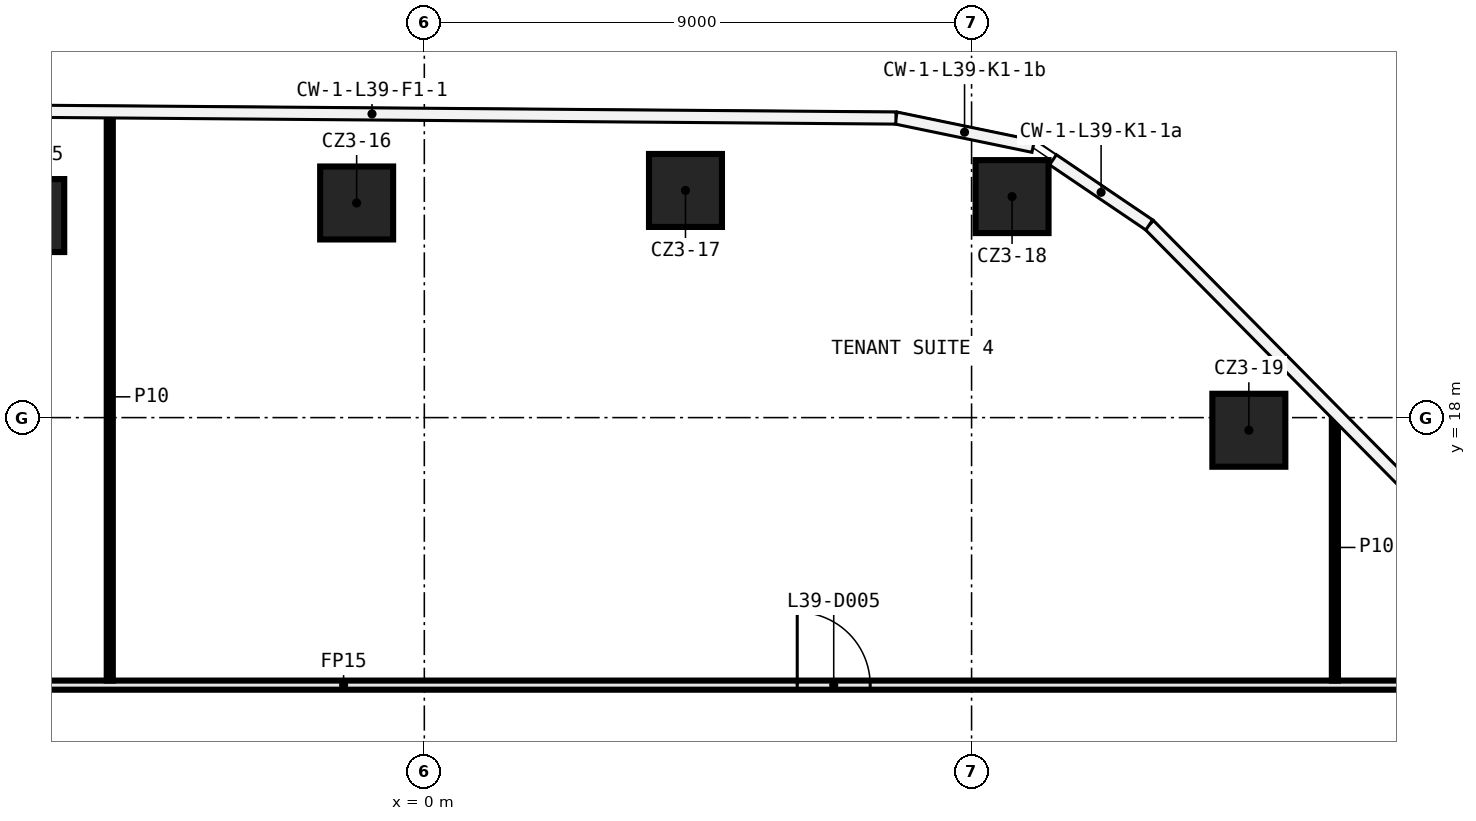
"""IFC4 building model, lengths in metres.
Left out: names, types, materials, properties, quantities, classifications, styles, units other than length and angle.
Written with IfcOpenShell. Run it as: python <this file> out.ifc"""

import sys

from ifc_helpers import new_model, si_unit, direction, frame, frame_2d, origin, origin_2d, place, context, subcontext, project, spatial, rectangle, extrude, element, fill, save


model = new_model("IFC4")
c1 = context("Model", 3, precision=1e-05, world=origin(), true_north=direction((0.0, 1.0)))
c2 = subcontext(c1, "Body", "Model", "MODEL_VIEW")
j1 = project(units=[si_unit("LENGTHUNIT", "METRE"), si_unit("PLANEANGLEUNIT", "RADIAN")], contexts=[c1])
p1 = place(None, origin())
s1 = spatial("IfcSite", under=j1, at=p1, CompositionType="ELEMENT")
p2 = place(p1, origin())
s2 = spatial("IfcBuilding", under=s1, at=p2, CompositionType="ELEMENT")
p3 = place(p2, frame((0.0, 0.0, 179.6)))
s3 = spatial("IfcBuildingStorey", under=s2, at=p3, CompositionType="ELEMENT", Elevation=179.6)
for number, where, z_axis, x_axis in (
    (1, (-6.522, 21.323, 0.0), (0.0, 0.0, 1.0), (1.0, 0.0, 0.0)),
    (2, (-1.113, 21.53, 0.0), (0.0, 0.0, 1.0), (1.0, 0.0, 0.0)),
    (3, (4.295, 21.736, 0.0), (0.0, 0.0, 1.0), (1.0, 0.0, 0.0)),
    (4, (9.666, 21.635, 0.0), (0.0, 0.0, 1.0), (1.0, 0.0, 0.0)),
    (5, (13.56, 17.792, 0.0), (0.0, 0.0, 1.0), (1.0, 0.0, 0.0)),
):
    element("IfcColumn", number, at=place(p3, frame(where, z_axis=z_axis, x_axis=x_axis)), inside=s3, PredefinedType="COLUMN", context=c2, shape_type="SweptSolid", body=[
        extrude(rectangle(XDim=1.2, YDim=1.2, at=origin_2d()), origin(), (0.0, 0.0, 1.0), 3.7),
    ])
p4 = place(p3, frame((-15.842, 13.6, 0.0), z_axis=(0.0, 0.0, 1.0), x_axis=(1.0, 0.0, 0.0)))
e6 = element("IfcWall", 6, at=p4, inside=s3, PredefinedType="PARTITIONING", context=c2, shape_type="SweptSolid", body=[
    extrude(rectangle(XDim=32.502, YDim=0.15, at=frame_2d((16.251, 0.0))), origin(), (0.0, 0.0, 1.0), 3.7),
])
p5 = place(p4, frame((21.974, 0.0, 0.0)))
e7 = element("IfcOpeningElement", 7, at=p5, cuts=e6, PredefinedType="OPENING", context=c2, shape_type="SweptSolid", body=[
    extrude(rectangle(XDim=1.2, YDim=2.1, at=frame_2d((0.6, 1.05))), frame((0.0, 0.085, 0.0), z_axis=(0.0, -1.0, 0.0), x_axis=(1.0, 0.0, 0.0)), (0.0, 0.0, 1.0), 0.17),
])
p6 = place(p4, frame((5.854, 0.0, 0.0)))
e8 = element("IfcOpeningElement", 8, at=p6, cuts=e6, PredefinedType="OPENING", context=c2, shape_type="SweptSolid", body=[
    extrude(rectangle(XDim=1.2, YDim=2.1, at=frame_2d((0.6, 1.05))), frame((0.0, 0.085, 0.0), z_axis=(0.0, -1.0, 0.0), x_axis=(1.0, 0.0, 0.0)), (0.0, 0.0, 1.0), 0.17),
])
p7 = place(p3, frame((14.975, 13.675, 0.0), z_axis=(0.0, 0.0, 1.0), x_axis=(0.0, 1.0, 0.0)))
e9 = element("IfcWall", 9, at=p7, inside=s3, PredefinedType="PARTITIONING", context=c2, shape_type="SweptSolid", body=[
    extrude(rectangle(XDim=4.379, YDim=0.1, at=frame_2d((2.189, 0.0))), origin(), (0.0, 0.0, 1.0), 3.7),
])
p8 = place(p3, frame((-5.173, 13.675, 0.0), z_axis=(0.0, 0.0, 1.0), x_axis=(0.0, 1.0, 0.0)))
e10 = element("IfcWall", 10, at=p8, inside=s3, PredefinedType="PARTITIONING", context=c2, shape_type="SweptSolid", body=[
    extrude(rectangle(XDim=9.333, YDim=0.1, at=frame_2d((4.667, 0.0))), origin(), (0.0, 0.0, 1.0), 3.7),
])
p9 = place(p5, origin())
e11 = element("IfcDoor", 11, at=p9, inside=s3, OperationType="SINGLE_SWING_RIGHT", PredefinedType="DOOR", context=c2, shape_type="SweptSolid", body=[
    extrude(rectangle(XDim=1.2, YDim=2.1, at=frame_2d((0.6, 1.05))), frame((0.0, 0.025, 0.0), z_axis=(0.0, -1.0, 0.0), x_axis=(1.0, 0.0, 0.0)), (0.0, 0.0, 1.0), 0.05),
])
fill(e7, e11)
save(model, sys.argv[1])
